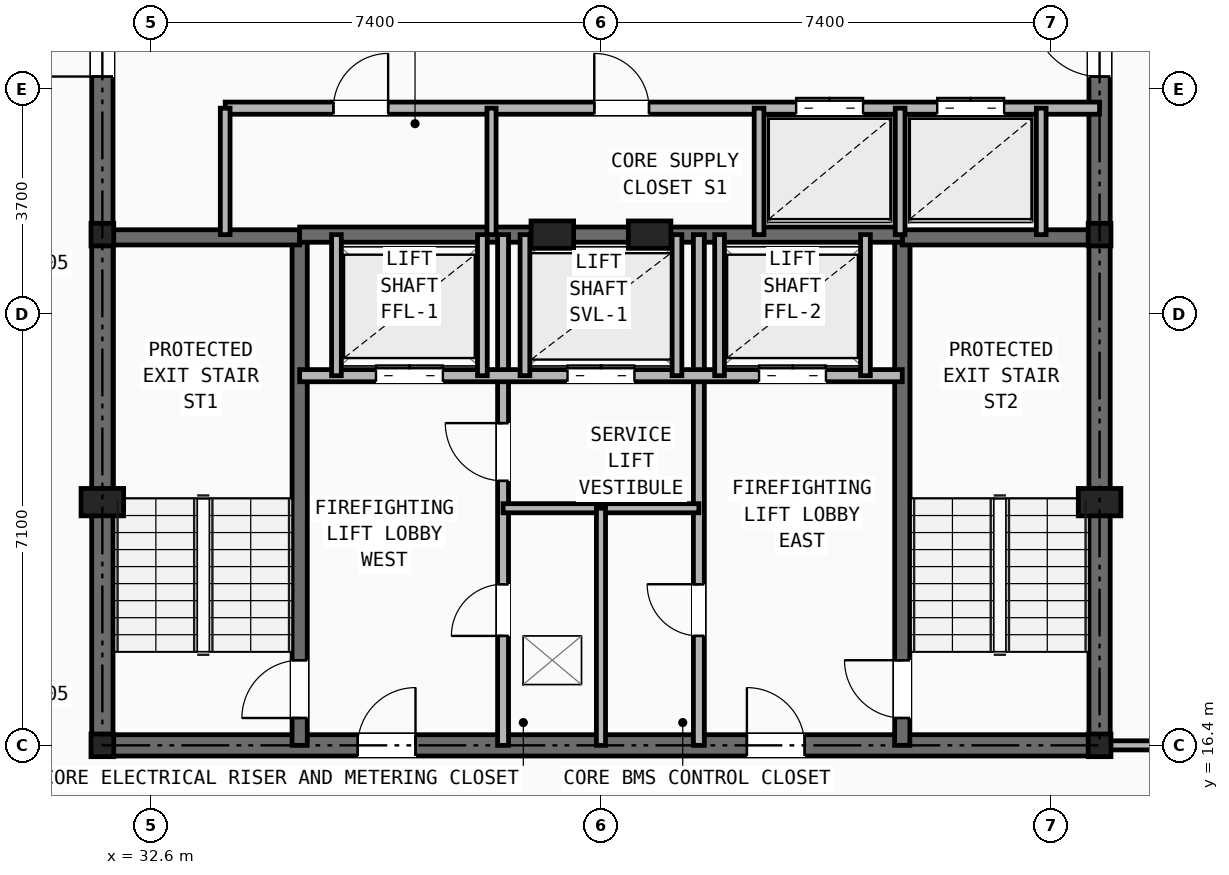
"""IFC4 building model, lengths in metres.
Left out: names, types, materials, properties, quantities, classifications, styles, units other than length and angle.
Written with IfcOpenShell. Run it as: python <this file> out.ifc"""

import sys

from ifc_helpers import new_model, si_unit, direction, frame, frame_2d, origin, origin_2d, place, context, subcontext, project, spatial, rectangle, i_section, extrude, element, fill, save


model = new_model("IFC4")
c1 = context("Model", 3, precision=1e-05, world=origin(), true_north=direction((0.0, 1.0)))
c2 = subcontext(c1, "Body", "Model", "MODEL_VIEW")
j1 = project(units=[si_unit("LENGTHUNIT", "METRE"), si_unit("PLANEANGLEUNIT", "RADIAN")], contexts=[c1])
p1 = place(None, origin())
s1 = spatial("IfcSite", under=j1, at=p1, CompositionType="ELEMENT")
p2 = place(p1, origin())
s2 = spatial("IfcBuilding", under=s1, at=p2, CompositionType="ELEMENT")
p3 = place(p2, frame((0.0, 0.0, 265.5)))
s3 = spatial("IfcBuildingStorey", under=s2, at=p3, CompositionType="ELEMENT", Elevation=265.5)
for number, where, z_axis, x_axis in (
    (1, (31.8, 16.4, 0.0), (0.0, 0.0, 1.0), (1.0, 0.0, 0.0)),
    (2, (48.2, 16.4, 0.0), (0.0, 0.0, 1.0), (1.0, 0.0, 0.0)),
    (3, (31.8, 24.8, 0.0), (0.0, 0.0, 1.0), (1.0, 0.0, 0.0)),
    (4, (48.2, 24.8, 0.0), (0.0, 0.0, 1.0), (1.0, 0.0, 0.0)),
):
    element("IfcColumn", number, at=place(p3, frame(where, z_axis=z_axis, x_axis=x_axis)), inside=s3, PredefinedType="COLUMN", context=c2, shape_type="SweptSolid", body=[
        extrude(i_section(OverallWidth=0.374, OverallDepth=0.372, WebThickness=0.016, FlangeThickness=0.026, at=origin_2d()), origin(), (0.0, 0.0, 1.0), 3.5),
    ])
for number, where, z_axis, x_axis in (
    (5, (31.8, 20.4, 0.0), (0.0, 0.0, 1.0), (1.0, 0.0, 0.0)),
    (6, (48.2, 20.4, 0.0), (0.0, 0.0, 1.0), (1.0, 0.0, 0.0)),
    (7, (39.2, 24.8, 0.0), (0.0, 0.0, 1.0), (1.0, 0.0, 0.0)),
    (8, (40.8, 24.8, 0.0), (0.0, 0.0, 1.0), (1.0, 0.0, 0.0)),
):
    element("IfcColumn", number, at=place(p3, frame(where, z_axis=z_axis, x_axis=x_axis)), inside=s3, PredefinedType="PILASTER", context=c2, shape_type="SweptSolid", body=[
        extrude(rectangle(XDim=0.7, YDim=0.45, at=origin_2d()), origin(), (0.0, 0.0, 1.0), 3.5),
    ])
p4 = place(p3, frame((31.8, 16.4, 0.0), z_axis=(0.0, 0.0, 1.0), x_axis=(1.0, 0.0, 0.0)))
e9 = element("IfcWall", 9, at=p4, inside=s3, PredefinedType="SHEAR", context=c2, shape_type="SweptSolid", body=[
    extrude(rectangle(XDim=16.4, YDim=0.35, at=frame_2d((8.2, 0.0))), origin(), (0.0, 0.0, 1.0), 3.25),
])
p5 = place(p4, frame((4.2, 0.0, 0.0)))
e10 = element("IfcOpeningElement", 10, at=p5, cuts=e9, PredefinedType="OPENING", context=c2, shape_type="SweptSolid", body=[
    extrude(rectangle(XDim=0.95, YDim=2.1, at=frame_2d((0.475, 1.05))), frame((0.0, 0.185, 0.0), z_axis=(0.0, -1.0, 0.0), x_axis=(1.0, 0.0, 0.0)), (0.0, 0.0, 1.0), 0.37),
])
p6 = place(p4, frame((10.6, 0.0, 0.0)))
e11 = element("IfcOpeningElement", 11, at=p6, cuts=e9, PredefinedType="OPENING", context=c2, shape_type="SweptSolid", body=[
    extrude(rectangle(XDim=0.95, YDim=2.1, at=frame_2d((0.475, 1.05))), frame((0.0, 0.185, 0.0), z_axis=(0.0, -1.0, 0.0), x_axis=(1.0, 0.0, 0.0)), (0.0, 0.0, 1.0), 0.37),
])
p7 = place(p3, frame((31.8, 16.4, 0.0), z_axis=(0.0, 0.0, 1.0), x_axis=(0.0, 1.0, 0.0)))
e12 = element("IfcWall", 12, at=p7, inside=s3, PredefinedType="SHEAR", context=c2, shape_type="SweptSolid", body=[
    extrude(rectangle(XDim=14.8, YDim=0.35, at=frame_2d((7.4, 0.0))), origin(), (0.0, 0.0, 1.0), 3.25),
])
p8 = place(p7, frame((11.0, 0.0, 0.0)))
e13 = element("IfcOpeningElement", 13, at=p8, cuts=e12, PredefinedType="OPENING", context=c2, shape_type="SweptSolid", body=[
    extrude(rectangle(XDim=1.1, YDim=2.15, at=frame_2d((0.55, 1.075))), frame((0.0, 0.185, 0.0), z_axis=(0.0, -1.0, 0.0), x_axis=(1.0, 0.0, 0.0)), (0.0, 0.0, 1.0), 0.37),
])
p9 = place(p3, frame((48.2, 16.4, 0.0), z_axis=(0.0, 0.0, 1.0), x_axis=(0.0, 1.0, 0.0)))
e14 = element("IfcWall", 14, at=p9, inside=s3, PredefinedType="SHEAR", context=c2, shape_type="SweptSolid", body=[
    extrude(rectangle(XDim=14.8, YDim=0.35, at=frame_2d((7.4, 0.0))), origin(), (0.0, 0.0, 1.0), 3.25),
])
p10 = place(p9, frame((11.0, 0.0, 0.0)))
e15 = element("IfcOpeningElement", 15, at=p10, cuts=e14, PredefinedType="OPENING", context=c2, shape_type="SweptSolid", body=[
    extrude(rectangle(XDim=1.1, YDim=2.15, at=frame_2d((0.55, 1.075))), frame((0.0, 0.185, 0.0), z_axis=(0.0, -1.0, 0.0), x_axis=(1.0, 0.0, 0.0)), (0.0, 0.0, 1.0), 0.37),
])
p11 = place(p3, frame((35.045, 16.4, 0.0), z_axis=(0.0, 0.0, 1.0), x_axis=(0.0, 1.0, 0.0)))
e16 = element("IfcWall", 16, at=p11, inside=s3, PredefinedType="SHEAR", context=c2, shape_type="SweptSolid", body=[
    extrude(rectangle(XDim=8.4, YDim=0.25, at=frame_2d((4.2, 0.0))), origin(), (0.0, 0.0, 1.0), 3.25),
])
p12 = place(p11, frame((0.45, 0.0, 0.0)))
e17 = element("IfcOpeningElement", 17, at=p12, cuts=e16, PredefinedType="OPENING", context=c2, shape_type="SweptSolid", body=[
    extrude(rectangle(XDim=0.95, YDim=2.1, at=frame_2d((0.475, 1.05))), frame((0.0, 0.135, 0.0), z_axis=(0.0, -1.0, 0.0), x_axis=(1.0, 0.0, 0.0)), (0.0, 0.0, 1.0), 0.27),
])
p13 = place(p3, frame((31.8, 24.755, 0.0), z_axis=(0.0, 0.0, 1.0), x_axis=(1.0, 0.0, 0.0)))
e18 = element("IfcWall", 18, at=p13, inside=s3, PredefinedType="SHEAR", context=c2, shape_type="SweptSolid", body=[
    extrude(rectangle(XDim=3.245, YDim=0.25, at=frame_2d((1.623, 0.0))), origin(), (0.0, 0.0, 1.0), 3.25),
])
p14 = place(p3, frame((44.955, 16.4, 0.0), z_axis=(0.0, 0.0, 1.0), x_axis=(0.0, 1.0, 0.0)))
e19 = element("IfcWall", 19, at=p14, inside=s3, PredefinedType="SHEAR", context=c2, shape_type="SweptSolid", body=[
    extrude(rectangle(XDim=8.4, YDim=0.25, at=frame_2d((4.2, 0.0))), origin(), (0.0, 0.0, 1.0), 3.25),
])
p15 = place(p14, frame((0.45, 0.0, 0.0)))
e20 = element("IfcOpeningElement", 20, at=p15, cuts=e19, PredefinedType="OPENING", context=c2, shape_type="SweptSolid", body=[
    extrude(rectangle(XDim=0.95, YDim=2.1, at=frame_2d((0.475, 1.05))), frame((0.0, 0.135, 0.0), z_axis=(0.0, -1.0, 0.0), x_axis=(1.0, 0.0, 0.0)), (0.0, 0.0, 1.0), 0.27),
])
p16 = place(p3, frame((44.955, 24.755, 0.0), z_axis=(0.0, 0.0, 1.0), x_axis=(1.0, 0.0, 0.0)))
e21 = element("IfcWall", 21, at=p16, inside=s3, PredefinedType="SHEAR", context=c2, shape_type="SweptSolid", body=[
    extrude(rectangle(XDim=3.245, YDim=0.25, at=frame_2d((1.623, 0.0))), origin(), (0.0, 0.0, 1.0), 3.25),
])
p17 = place(p3, frame((35.045, 24.8, 0.0), z_axis=(0.0, 0.0, 1.0), x_axis=(1.0, 0.0, 0.0)))
e22 = element("IfcWall", 22, at=p17, inside=s3, PredefinedType="SHEAR", context=c2, shape_type="SweptSolid", body=[
    extrude(rectangle(XDim=9.91, YDim=0.25, at=frame_2d((4.955, 0.0))), origin(), (0.0, 0.0, 1.0), 3.25),
])
p18 = place(p3, frame((38.39, 16.4, 0.0), z_axis=(0.0, 0.0, 1.0), x_axis=(0.0, 1.0, 0.0)))
e23 = element("IfcWall", 23, at=p18, inside=s3, PredefinedType="PARTITIONING", context=c2, shape_type="SweptSolid", body=[
    extrude(rectangle(XDim=8.4, YDim=0.18, at=frame_2d((4.2, 0.0))), origin(), (0.0, 0.0, 1.0), 2.978),
])
p19 = place(p18, frame((1.8, 0.0, 0.0)))
e24 = element("IfcOpeningElement", 24, at=p19, cuts=e23, PredefinedType="OPENING", context=c2, shape_type="SweptSolid", body=[
    extrude(rectangle(XDim=0.85, YDim=2.05, at=frame_2d((0.425, 1.025))), frame((0.0, 0.1, 0.0), z_axis=(0.0, -1.0, 0.0), x_axis=(1.0, 0.0, 0.0)), (0.0, 0.0, 1.0), 0.2),
])
p20 = place(p18, frame((4.35, 0.0, 0.0)))
e25 = element("IfcOpeningElement", 25, at=p20, cuts=e23, PredefinedType="OPENING", context=c2, shape_type="SweptSolid", body=[
    extrude(rectangle(XDim=0.95, YDim=2.1, at=frame_2d((0.475, 1.05))), frame((0.0, 0.1, 0.0), z_axis=(0.0, -1.0, 0.0), x_axis=(1.0, 0.0, 0.0)), (0.0, 0.0, 1.0), 0.2),
])
p21 = place(p3, frame((41.61, 16.4, 0.0), z_axis=(0.0, 0.0, 1.0), x_axis=(0.0, 1.0, 0.0)))
e26 = element("IfcWall", 26, at=p21, inside=s3, PredefinedType="PARTITIONING", context=c2, shape_type="SweptSolid", body=[
    extrude(rectangle(XDim=8.4, YDim=0.18, at=frame_2d((4.2, 0.0))), origin(), (0.0, 0.0, 1.0), 2.978),
])
p22 = place(p21, frame((1.8, 0.0, 0.0)))
e27 = element("IfcOpeningElement", 27, at=p22, cuts=e26, PredefinedType="OPENING", context=c2, shape_type="SweptSolid", body=[
    extrude(rectangle(XDim=0.85, YDim=2.05, at=frame_2d((0.425, 1.025))), frame((0.0, 0.1, 0.0), z_axis=(0.0, -1.0, 0.0), x_axis=(1.0, 0.0, 0.0)), (0.0, 0.0, 1.0), 0.2),
])
p23 = place(p3, frame((35.045, 22.48, 0.0), z_axis=(0.0, 0.0, 1.0), x_axis=(1.0, 0.0, 0.0)))
e28 = element("IfcWall", 28, at=p23, inside=s3, PredefinedType="SOLIDWALL", context=c2, shape_type="SweptSolid", body=[
    extrude(rectangle(XDim=9.91, YDim=0.2, at=frame_2d((4.955, 0.0))), origin(), (0.0, 0.0, 1.0), 3.25),
])
p24 = place(p23, frame((1.255, 0.0, 0.0)))
e29 = element("IfcOpeningElement", 29, at=p24, cuts=e28, PredefinedType="OPENING", context=c2, shape_type="SweptSolid", body=[
    extrude(rectangle(XDim=1.1, YDim=2.15, at=frame_2d((0.55, 1.075))), frame((0.0, 0.11, 0.0), z_axis=(0.0, -1.0, 0.0), x_axis=(1.0, 0.0, 0.0)), (0.0, 0.0, 1.0), 0.22),
])
p25 = place(p23, frame((7.555, 0.0, 0.0)))
e30 = element("IfcOpeningElement", 30, at=p25, cuts=e28, PredefinedType="OPENING", context=c2, shape_type="SweptSolid", body=[
    extrude(rectangle(XDim=1.1, YDim=2.15, at=frame_2d((0.55, 1.075))), frame((0.0, 0.11, 0.0), z_axis=(0.0, -1.0, 0.0), x_axis=(1.0, 0.0, 0.0)), (0.0, 0.0, 1.0), 0.22),
])
p26 = place(p23, frame((4.405, 0.0, 0.0)))
e31 = element("IfcOpeningElement", 31, at=p26, cuts=e28, PredefinedType="OPENING", context=c2, shape_type="SweptSolid", body=[
    extrude(rectangle(XDim=1.1, YDim=2.15, at=frame_2d((0.55, 1.075))), frame((0.0, 0.11, 0.0), z_axis=(0.0, -1.0, 0.0), x_axis=(1.0, 0.0, 0.0)), (0.0, 0.0, 1.0), 0.22),
])
p27 = place(p3, frame((38.39, 20.3, 0.0), z_axis=(0.0, 0.0, 1.0), x_axis=(1.0, 0.0, 0.0)))
e32 = element("IfcWall", 32, at=p27, inside=s3, PredefinedType="PARTITIONING", context=c2, shape_type="SweptSolid", body=[
    extrude(rectangle(XDim=3.22, YDim=0.15, at=frame_2d((1.61, 0.0))), origin(), (0.0, 0.0, 1.0), 3.25),
])
p28 = place(p3, frame((40.0, 16.4, 0.0), z_axis=(0.0, 0.0, 1.0), x_axis=(0.0, 1.0, 0.0)))
e33 = element("IfcWall", 33, at=p28, inside=s3, PredefinedType="PARTITIONING", context=c2, shape_type="SweptSolid", body=[
    extrude(rectangle(XDim=3.9, YDim=0.15, at=frame_2d((1.95, 0.0))), origin(), (0.0, 0.0, 1.0), 2.978),
])
for number, where, z_axis, x_axis in (
    (34, (35.65, 22.48, 0.0), (0.0, 0.0, 1.0), (0.0, 1.0, 0.0)),
    (35, (38.05, 22.48, 0.0), (0.0, 0.0, 1.0), (0.0, 1.0, 0.0)),
    (36, (41.95, 22.48, 0.0), (0.0, 0.0, 1.0), (0.0, 1.0, 0.0)),
    (37, (44.35, 22.48, 0.0), (0.0, 0.0, 1.0), (0.0, 1.0, 0.0)),
    (38, (38.75, 22.48, 0.0), (0.0, 0.0, 1.0), (0.0, 1.0, 0.0)),
    (39, (41.25, 22.48, 0.0), (0.0, 0.0, 1.0), (0.0, 1.0, 0.0)),
):
    element("IfcWall", number, at=place(p3, frame(where, z_axis=z_axis, x_axis=x_axis)), inside=s3, PredefinedType="SOLIDWALL", context=c2, shape_type="SweptSolid", body=[
        extrude(rectangle(XDim=2.32, YDim=0.16, at=frame_2d((1.16, 0.0))), origin(), (0.0, 0.0, 1.0), 3.25),
    ])
p29 = place(p3, frame((33.82, 26.88, 0.0), z_axis=(0.0, 0.0, 1.0), x_axis=(1.0, 0.0, 0.0)))
e40 = element("IfcWall", 40, at=p29, inside=s3, PredefinedType="SOLIDWALL", context=c2, shape_type="SweptSolid", body=[
    extrude(rectangle(XDim=14.38, YDim=0.2, at=frame_2d((7.19, 0.0))), origin(), (0.0, 0.0, 1.0), 2.705),
])
p30 = place(p29, frame((1.78, 0.0, 0.0)))
e41 = element("IfcOpeningElement", 41, at=p30, cuts=e40, PredefinedType="OPENING", context=c2, shape_type="SweptSolid", body=[
    extrude(rectangle(XDim=0.9, YDim=2.1, at=frame_2d((0.45, 1.05))), frame((0.0, 0.11, 0.0), z_axis=(0.0, -1.0, 0.0), x_axis=(1.0, 0.0, 0.0)), (0.0, 0.0, 1.0), 0.22),
])
p31 = place(p29, frame((6.07, 0.0, 0.0)))
e42 = element("IfcOpeningElement", 42, at=p31, cuts=e40, PredefinedType="OPENING", context=c2, shape_type="SweptSolid", body=[
    extrude(rectangle(XDim=0.9, YDim=2.1, at=frame_2d((0.45, 1.05))), frame((0.0, 0.11, 0.0), z_axis=(0.0, -1.0, 0.0), x_axis=(1.0, 0.0, 0.0)), (0.0, 0.0, 1.0), 0.22),
])
p32 = place(p29, frame((9.39, 0.0, 0.0)))
e43 = element("IfcOpeningElement", 43, at=p32, cuts=e40, PredefinedType="OPENING", context=c2, shape_type="SweptSolid", body=[
    extrude(rectangle(XDim=1.1, YDim=2.15, at=frame_2d((0.55, 1.075))), frame((0.0, 0.11, 0.0), z_axis=(0.0, -1.0, 0.0), x_axis=(1.0, 0.0, 0.0)), (0.0, 0.0, 1.0), 0.22),
])
p33 = place(p29, frame((11.71, 0.0, 0.0)))
e44 = element("IfcOpeningElement", 44, at=p33, cuts=e40, PredefinedType="OPENING", context=c2, shape_type="SweptSolid", body=[
    extrude(rectangle(XDim=1.1, YDim=2.15, at=frame_2d((0.55, 1.075))), frame((0.0, 0.11, 0.0), z_axis=(0.0, -1.0, 0.0), x_axis=(1.0, 0.0, 0.0)), (0.0, 0.0, 1.0), 0.22),
])
p34 = place(p3, frame((33.82, 24.8, 0.0), z_axis=(0.0, 0.0, 1.0), x_axis=(0.0, 1.0, 0.0)))
e45 = element("IfcWall", 45, at=p34, inside=s3, PredefinedType="SOLIDWALL", context=c2, shape_type="SweptSolid", body=[
    extrude(rectangle(XDim=2.08, YDim=0.16, at=frame_2d((1.04, 0.0))), origin(), (0.0, 0.0, 1.0), 3.25),
])
p35 = place(p3, frame((38.2, 24.8, 0.0), z_axis=(0.0, 0.0, 1.0), x_axis=(0.0, 1.0, 0.0)))
e46 = element("IfcWall", 46, at=p35, inside=s3, PredefinedType="PARTITIONING", context=c2, shape_type="SweptSolid", body=[
    extrude(rectangle(XDim=2.08, YDim=0.15, at=frame_2d((1.04, 0.0))), origin(), (0.0, 0.0, 1.0), 3.25),
])
for number, where, z_axis, x_axis in (
    (47, (42.6, 24.8, 0.0), (0.0, 0.0, 1.0), (0.0, 1.0, 0.0)),
    (48, (44.92, 24.8, 0.0), (0.0, 0.0, 1.0), (0.0, 1.0, 0.0)),
    (49, (47.24, 24.8, 0.0), (0.0, 0.0, 1.0), (0.0, 1.0, 0.0)),
):
    element("IfcWall", number, at=place(p3, frame(where, z_axis=z_axis, x_axis=x_axis)), inside=s3, PredefinedType="SOLIDWALL", context=c2, shape_type="SweptSolid", body=[
        extrude(rectangle(XDim=2.08, YDim=0.16, at=frame_2d((1.04, 0.0))), origin(), (0.0, 0.0, 1.0), 3.25),
    ])
p36 = place(p3, frame((48.2, 16.4, 0.0), z_axis=(0.0, 0.0, 1.0), x_axis=(1.0, 0.0, 0.0)))
e50 = element("IfcWall", 50, at=p36, inside=s3, PredefinedType="PARTITIONING", context=c2, shape_type="SweptSolid", body=[
    extrude(rectangle(XDim=15.135, YDim=0.15, at=frame_2d((7.568, 0.0))), origin(), (0.0, 0.0, 1.0), 2.292),
])
p37 = place(p19, origin())
e51 = element("IfcDoor", 51, at=p37, inside=s3, OperationType="SINGLE_SWING_LEFT", PredefinedType="DOOR", context=c2, shape_type="SweptSolid", body=[
    extrude(rectangle(XDim=0.85, YDim=2.05, at=frame_2d((0.425, 1.025))), frame((0.0, 0.025, 0.0), z_axis=(0.0, -1.0, 0.0), x_axis=(1.0, 0.0, 0.0)), (0.0, 0.0, 1.0), 0.05),
])
fill(e24, e51)
p38 = place(p22, origin())
e52 = element("IfcDoor", 52, at=p38, inside=s3, OperationType="SINGLE_SWING_RIGHT", PredefinedType="DOOR", context=c2, shape_type="SweptSolid", body=[
    extrude(rectangle(XDim=0.85, YDim=2.05, at=frame_2d((0.425, 1.025))), frame((0.0, 0.025, 0.0), z_axis=(0.0, -1.0, 0.0), x_axis=(1.0, 0.0, 0.0)), (0.0, 0.0, 1.0), 0.05),
])
fill(e27, e52)
p39 = place(p20, origin())
e53 = element("IfcDoor", 53, at=p39, inside=s3, OperationType="SINGLE_SWING_RIGHT", PredefinedType="DOOR", context=c2, shape_type="SweptSolid", body=[
    extrude(rectangle(XDim=0.95, YDim=2.1, at=frame_2d((0.475, 1.05))), frame((0.0, 0.025, 0.0), z_axis=(0.0, -1.0, 0.0), x_axis=(1.0, 0.0, 0.0)), (0.0, 0.0, 1.0), 0.05),
])
fill(e25, e53)
p40 = place(p12, origin())
e54 = element("IfcDoor", 54, at=p40, inside=s3, OperationType="SINGLE_SWING_LEFT", PredefinedType="DOOR", context=c2, shape_type="SweptSolid", body=[
    extrude(rectangle(XDim=0.95, YDim=2.1, at=frame_2d((0.475, 1.05))), frame((0.0, 0.025, 0.0), z_axis=(0.0, -1.0, 0.0), x_axis=(1.0, 0.0, 0.0)), (0.0, 0.0, 1.0), 0.05),
])
fill(e17, e54)
p41 = place(p15, origin())
e55 = element("IfcDoor", 55, at=p41, inside=s3, OperationType="SINGLE_SWING_RIGHT", PredefinedType="DOOR", context=c2, shape_type="SweptSolid", body=[
    extrude(rectangle(XDim=0.95, YDim=2.1, at=frame_2d((0.475, 1.05))), frame((0.0, 0.025, 0.0), z_axis=(0.0, -1.0, 0.0), x_axis=(1.0, 0.0, 0.0)), (0.0, 0.0, 1.0), 0.05),
])
fill(e20, e55)
p42 = place(p5, origin())
e56 = element("IfcDoor", 56, at=p42, inside=s3, OperationType="SINGLE_SWING_RIGHT", PredefinedType="DOOR", context=c2, shape_type="SweptSolid", body=[
    extrude(rectangle(XDim=0.95, YDim=2.1, at=frame_2d((0.475, 1.05))), frame((0.0, 0.025, 0.0), z_axis=(0.0, -1.0, 0.0), x_axis=(1.0, 0.0, 0.0)), (0.0, 0.0, 1.0), 0.05),
])
fill(e10, e56)
p43 = place(p6, origin())
e57 = element("IfcDoor", 57, at=p43, inside=s3, OperationType="SINGLE_SWING_LEFT", PredefinedType="DOOR", context=c2, shape_type="SweptSolid", body=[
    extrude(rectangle(XDim=0.95, YDim=2.1, at=frame_2d((0.475, 1.05))), frame((0.0, 0.025, 0.0), z_axis=(0.0, -1.0, 0.0), x_axis=(1.0, 0.0, 0.0)), (0.0, 0.0, 1.0), 0.05),
])
fill(e11, e57)
p44 = place(p24, origin())
e58 = element("IfcDoor", 58, at=p44, inside=s3, OperationType="DOUBLE_DOOR_SLIDING", PredefinedType="DOOR", context=c2, shape_type="SweptSolid", body=[
    extrude(rectangle(XDim=1.1, YDim=2.15, at=frame_2d((0.55, 1.075))), frame((0.0, 0.025, 0.0), z_axis=(0.0, -1.0, 0.0), x_axis=(1.0, 0.0, 0.0)), (0.0, 0.0, 1.0), 0.05),
])
fill(e29, e58)
p45 = place(p25, origin())
e59 = element("IfcDoor", 59, at=p45, inside=s3, OperationType="DOUBLE_DOOR_SLIDING", PredefinedType="DOOR", context=c2, shape_type="SweptSolid", body=[
    extrude(rectangle(XDim=1.1, YDim=2.15, at=frame_2d((0.55, 1.075))), frame((0.0, 0.025, 0.0), z_axis=(0.0, -1.0, 0.0), x_axis=(1.0, 0.0, 0.0)), (0.0, 0.0, 1.0), 0.05),
])
fill(e30, e59)
p46 = place(p26, origin())
e60 = element("IfcDoor", 60, at=p46, inside=s3, OperationType="DOUBLE_DOOR_SLIDING", PredefinedType="DOOR", context=c2, shape_type="SweptSolid", body=[
    extrude(rectangle(XDim=1.1, YDim=2.15, at=frame_2d((0.55, 1.075))), frame((0.0, 0.025, 0.0), z_axis=(0.0, -1.0, 0.0), x_axis=(1.0, 0.0, 0.0)), (0.0, 0.0, 1.0), 0.05),
])
fill(e31, e60)
p47 = place(p8, origin())
e61 = element("IfcDoor", 61, at=p47, inside=s3, OperationType="SINGLE_SWING_LEFT", PredefinedType="DOOR", context=c2, shape_type="SweptSolid", body=[
    extrude(rectangle(XDim=1.1, YDim=2.15, at=frame_2d((0.55, 1.075))), frame((0.0, 0.025, 0.0), z_axis=(0.0, -1.0, 0.0), x_axis=(1.0, 0.0, 0.0)), (0.0, 0.0, 1.0), 0.05),
])
fill(e13, e61)
p48 = place(p10, origin())
e62 = element("IfcDoor", 62, at=p48, inside=s3, OperationType="SINGLE_SWING_RIGHT", PredefinedType="DOOR", context=c2, shape_type="SweptSolid", body=[
    extrude(rectangle(XDim=1.1, YDim=2.15, at=frame_2d((0.55, 1.075))), frame((0.0, 0.025, 0.0), z_axis=(0.0, -1.0, 0.0), x_axis=(1.0, 0.0, 0.0)), (0.0, 0.0, 1.0), 0.05),
])
fill(e15, e62)
p49 = place(p30, origin())
e63 = element("IfcDoor", 63, at=p49, inside=s3, OperationType="SINGLE_SWING_RIGHT", PredefinedType="DOOR", context=c2, shape_type="SweptSolid", body=[
    extrude(rectangle(XDim=0.9, YDim=2.1, at=frame_2d((0.45, 1.05))), frame((0.0, 0.025, 0.0), z_axis=(0.0, -1.0, 0.0), x_axis=(1.0, 0.0, 0.0)), (0.0, 0.0, 1.0), 0.05),
])
fill(e41, e63)
p50 = place(p31, origin())
e64 = element("IfcDoor", 64, at=p50, inside=s3, OperationType="SINGLE_SWING_LEFT", PredefinedType="DOOR", context=c2, shape_type="SweptSolid", body=[
    extrude(rectangle(XDim=0.9, YDim=2.1, at=frame_2d((0.45, 1.05))), frame((0.0, 0.025, 0.0), z_axis=(0.0, -1.0, 0.0), x_axis=(1.0, 0.0, 0.0)), (0.0, 0.0, 1.0), 0.05),
])
fill(e42, e64)
p51 = place(p32, origin())
e65 = element("IfcDoor", 65, at=p51, inside=s3, OperationType="DOUBLE_DOOR_SLIDING", PredefinedType="DOOR", context=c2, shape_type="SweptSolid", body=[
    extrude(rectangle(XDim=1.1, YDim=2.15, at=frame_2d((0.55, 1.075))), frame((0.0, 0.025, 0.0), z_axis=(0.0, -1.0, 0.0), x_axis=(1.0, 0.0, 0.0)), (0.0, 0.0, 1.0), 0.05),
])
fill(e43, e65)
p52 = place(p33, origin())
e66 = element("IfcDoor", 66, at=p52, inside=s3, OperationType="DOUBLE_DOOR_SLIDING", PredefinedType="DOOR", context=c2, shape_type="SweptSolid", body=[
    extrude(rectangle(XDim=1.1, YDim=2.15, at=frame_2d((0.55, 1.075))), frame((0.0, 0.025, 0.0), z_axis=(0.0, -1.0, 0.0), x_axis=(1.0, 0.0, 0.0)), (0.0, 0.0, 1.0), 0.05),
])
fill(e44, e66)
save(model, sys.argv[1])
